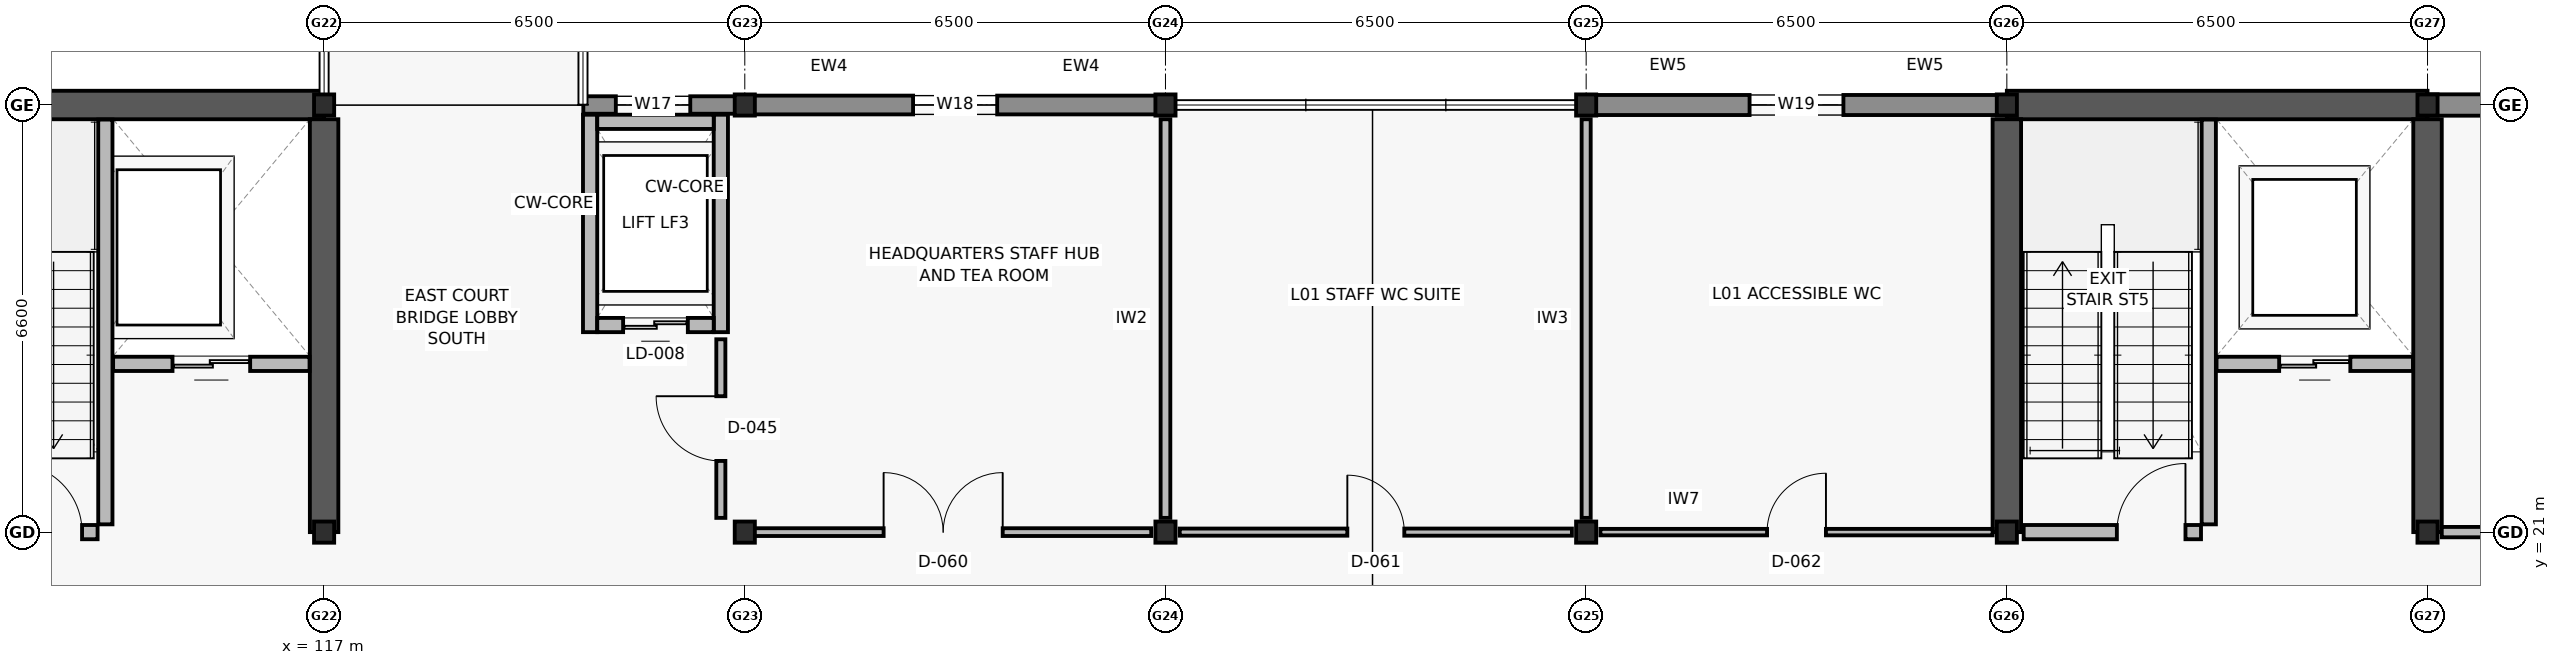
"""IFC4 building model, lengths in metres.
Left out: names, types, materials, properties, quantities, classifications, styles, units other than length and angle.
Written with IfcOpenShell. Run it as: python <this file> out.ifc"""

import sys

from ifc_helpers import new_model, si_unit, direction, frame, frame_2d, origin, origin_2d, place, context, subcontext, project, spatial, rectangle, i_section, extrude, element, fill, save


model = new_model("IFC4")
c1 = context("Model", 3, precision=1e-05, world=origin(), true_north=direction((0.0, 1.0)))
c2 = subcontext(c1, "Body", "Model", "MODEL_VIEW")
j1 = project(units=[si_unit("LENGTHUNIT", "METRE"), si_unit("PLANEANGLEUNIT", "RADIAN")], contexts=[c1])
p1 = place(None, origin())
s1 = spatial("IfcSite", under=j1, at=p1, CompositionType="ELEMENT")
p2 = place(p1, origin())
s2 = spatial("IfcBuilding", under=s1, at=p2, CompositionType="ELEMENT")
p3 = place(p2, frame((0.0, 0.0, 5.4)))
s3 = spatial("IfcBuildingStorey", under=s2, at=p3, CompositionType="ELEMENT", Elevation=5.4)
for number, where, z_axis, x_axis in (
    (1, (117.0, 21.0, 0.0), (0.0, 0.0, 1.0), (1.0, 0.0, 0.0)),
    (2, (117.0, 27.6, 0.0), (0.0, 0.0, 1.0), (1.0, 0.0, 0.0)),
    (3, (123.5, 21.0, 0.0), (0.0, 0.0, 1.0), (1.0, 0.0, 0.0)),
    (4, (123.5, 27.6, 0.0), (0.0, 0.0, 1.0), (1.0, 0.0, 0.0)),
    (5, (130.0, 21.0, 0.0), (0.0, 0.0, 1.0), (1.0, 0.0, 0.0)),
    (6, (130.0, 27.6, 0.0), (0.0, 0.0, 1.0), (1.0, 0.0, 0.0)),
    (7, (136.5, 21.0, 0.0), (0.0, 0.0, 1.0), (1.0, 0.0, 0.0)),
    (8, (136.5, 27.6, 0.0), (0.0, 0.0, 1.0), (1.0, 0.0, 0.0)),
    (9, (143.0, 21.0, 0.0), (0.0, 0.0, 1.0), (1.0, 0.0, 0.0)),
    (10, (143.0, 27.6, 0.0), (0.0, 0.0, 1.0), (1.0, 0.0, 0.0)),
    (11, (149.5, 21.0, 0.0), (0.0, 0.0, 1.0), (1.0, 0.0, 0.0)),
    (12, (149.5, 27.6, 0.0), (0.0, 0.0, 1.0), (1.0, 0.0, 0.0)),
):
    element("IfcColumn", number, at=place(p3, frame(where, z_axis=z_axis, x_axis=x_axis)), inside=s3, PredefinedType="COLUMN", context=c2, shape_type="SweptSolid", body=[
        extrude(i_section(OverallWidth=0.311, OverallDepth=0.327, WebThickness=0.016, FlangeThickness=0.025, FilletRadius=0.017, at=origin_2d()), origin(), (0.0, 0.0, 1.0), 4.2),
    ])
p4 = place(p3, frame((110.5, 27.6, 0.0), z_axis=(0.0, 0.0, 1.0), x_axis=(1.0, 0.0, 0.0)))
e13 = element("IfcWall", 13, at=p4, inside=s3, PredefinedType="SHEAR", context=c2, shape_type="SweptSolid", body=[
    extrude(rectangle(XDim=6.5, YDim=0.44, at=frame_2d((3.25, 0.0))), origin(), (0.0, 0.0, 1.0), 3.96),
])
p5 = place(p3, frame((117.0, 21.0, 0.0), z_axis=(0.0, 0.0, 1.0), x_axis=(0.0, 1.0, 0.0)))
e14 = element("IfcWall", 14, at=p5, inside=s3, PredefinedType="SHEAR", context=c2, shape_type="SweptSolid", body=[
    extrude(rectangle(XDim=6.38, YDim=0.44, at=frame_2d((3.19, 0.0))), origin(), (0.0, 0.0, 1.0), 3.96),
])
p6 = place(p3, frame((143.0, 27.6, 0.0), z_axis=(0.0, 0.0, 1.0), x_axis=(1.0, 0.0, 0.0)))
e15 = element("IfcWall", 15, at=p6, inside=s3, PredefinedType="SHEAR", context=c2, shape_type="SweptSolid", body=[
    extrude(rectangle(XDim=6.5, YDim=0.44, at=frame_2d((3.25, 0.0))), origin(), (0.0, 0.0, 1.0), 3.96),
])
for number, where, z_axis, x_axis in (
    (16, (143.0, 21.0, 0.0), (0.0, 0.0, 1.0), (0.0, 1.0, 0.0)),
    (17, (149.5, 21.0, 0.0), (0.0, 0.0, 1.0), (0.0, 1.0, 0.0)),
):
    element("IfcWall", number, at=place(p3, frame(where, z_axis=z_axis, x_axis=x_axis)), inside=s3, PredefinedType="SHEAR", context=c2, shape_type="SweptSolid", body=[
        extrude(rectangle(XDim=6.38, YDim=0.44, at=frame_2d((3.19, 0.0))), origin(), (0.0, 0.0, 1.0), 3.96),
    ])
p7 = place(p3, frame((121.005, 27.6, 0.0), z_axis=(0.0, 0.0, 1.0), x_axis=(1.0, 0.0, 0.0)))
e18 = element("IfcWall", 18, at=p7, inside=s3, PredefinedType="SOLIDWALL", context=c2, shape_type="SweptSolid", body=[
    extrude(rectangle(XDim=2.49, YDim=0.27, at=frame_2d((1.245, 0.0))), origin(), (0.0, 0.0, 1.0), 3.32),
])
p8 = place(p7, frame((0.502, 0.0, 0.8)))
e19 = element("IfcOpeningElement", 19, at=p8, cuts=e18, PredefinedType="OPENING", context=c2, shape_type="SweptSolid", body=[
    extrude(rectangle(XDim=1.15, YDim=1.8, at=frame_2d((0.575, 0.9))), frame((0.0, 0.145, 0.0), z_axis=(0.0, -1.0, 0.0), x_axis=(1.0, 0.0, 0.0)), (0.0, 0.0, 1.0), 0.29),
])
p9 = place(p3, frame((123.505, 27.6, 0.0), z_axis=(0.0, 0.0, 1.0), x_axis=(1.0, 0.0, 0.0)))
e20 = element("IfcWall", 20, at=p9, inside=s3, PredefinedType="SOLIDWALL", context=c2, shape_type="SweptSolid", body=[
    extrude(rectangle(XDim=6.49, YDim=0.29, at=frame_2d((3.245, 0.0))), origin(), (0.0, 0.0, 1.0), 3.32),
])
p10 = place(p9, frame((2.595, 0.0, 0.8)))
e21 = element("IfcOpeningElement", 21, at=p10, cuts=e20, PredefinedType="OPENING", context=c2, shape_type="SweptSolid", body=[
    extrude(rectangle(XDim=1.3, YDim=1.8, at=frame_2d((0.65, 0.9))), frame((0.0, 0.155, 0.0), z_axis=(0.0, -1.0, 0.0), x_axis=(1.0, 0.0, 0.0)), (0.0, 0.0, 1.0), 0.31),
])
p11 = place(p3, frame((136.505, 27.6, 0.0), z_axis=(0.0, 0.0, 1.0), x_axis=(1.0, 0.0, 0.0)))
e22 = element("IfcWall", 22, at=p11, inside=s3, PredefinedType="SOLIDWALL", context=c2, shape_type="SweptSolid", body=[
    extrude(rectangle(XDim=6.49, YDim=0.31, at=frame_2d((3.245, 0.0))), origin(), (0.0, 0.0, 1.0), 3.32),
])
p12 = place(p11, frame((2.52, 0.0, 0.8)))
e23 = element("IfcOpeningElement", 23, at=p12, cuts=e22, PredefinedType="OPENING", context=c2, shape_type="SweptSolid", body=[
    extrude(rectangle(XDim=1.45, YDim=1.8, at=frame_2d((0.725, 0.9))), frame((0.0, 0.165, 0.0), z_axis=(0.0, -1.0, 0.0), x_axis=(1.0, 0.0, 0.0)), (0.0, 0.0, 1.0), 0.33),
])
p13 = place(p3, frame((149.505, 27.6, 0.0), z_axis=(0.0, 0.0, 1.0), x_axis=(1.0, 0.0, 0.0)))
e24 = element("IfcWall", 24, at=p13, inside=s3, PredefinedType="SOLIDWALL", context=c2, shape_type="SweptSolid", body=[
    extrude(rectangle(XDim=6.49, YDim=0.33, at=frame_2d((3.245, 0.0))), origin(), (0.0, 0.0, 1.0), 3.32),
])
p14 = place(p13, frame((2.445, 0.0, 0.8)))
e25 = element("IfcOpeningElement", 25, at=p14, cuts=e24, PredefinedType="OPENING", context=c2, shape_type="SweptSolid", body=[
    extrude(rectangle(XDim=1.6, YDim=1.8, at=frame_2d((0.8, 0.9))), frame((0.0, 0.175, 0.0), z_axis=(0.0, -1.0, 0.0), x_axis=(1.0, 0.0, 0.0)), (0.0, 0.0, 1.0), 0.35),
])
p15 = place(p3, frame((113.62, 21.12, 0.0), z_axis=(0.0, 0.0, 1.0), x_axis=(0.0, 1.0, 0.0)))
e26 = element("IfcWall", 26, at=p15, inside=s3, PredefinedType="SOLIDWALL", context=c2, shape_type="SweptSolid", body=[
    extrude(rectangle(XDim=6.255, YDim=0.22, at=frame_2d((3.127, 0.0))), origin(), (0.0, 0.0, 1.0), 3.96),
])
p16 = place(p3, frame((110.76, 21.0, 0.0), z_axis=(0.0, 0.0, 1.0), x_axis=(1.0, 0.0, 0.0)))
e27 = element("IfcWall", 27, at=p16, inside=s3, PredefinedType="SOLIDWALL", context=c2, shape_type="SweptSolid", body=[
    extrude(rectangle(XDim=2.74, YDim=0.22, at=frame_2d((1.37, 0.0))), origin(), (0.0, 0.0, 1.0), 3.32),
])
p17 = place(p16, frame((1.44, 0.0, 0.0)))
e28 = element("IfcOpeningElement", 28, at=p17, cuts=e27, PredefinedType="OPENING", context=c2, shape_type="SweptSolid", body=[
    extrude(rectangle(XDim=1.06, YDim=2.1, at=frame_2d((0.53, 1.05))), frame((0.0, 0.12, 0.0), z_axis=(0.0, -1.0, 0.0), x_axis=(1.0, 0.0, 0.0)), (0.0, 0.0, 1.0), 0.24),
])
p18 = place(p3, frame((113.74, 23.6, 0.0), z_axis=(0.0, 0.0, 1.0), x_axis=(1.0, 0.0, 0.0)))
e29 = element("IfcWall", 29, at=p18, inside=s3, PredefinedType="SOLIDWALL", context=c2, shape_type="SweptSolid", body=[
    extrude(rectangle(XDim=3.035, YDim=0.22, at=frame_2d((1.518, 0.0))), origin(), (0.0, 0.0, 1.0), 3.96),
])
p19 = place(p18, frame((0.917, 0.0, 0.0)))
e30 = element("IfcOpeningElement", 30, at=p19, cuts=e29, PredefinedType="OPENING", context=c2, shape_type="SweptSolid", body=[
    extrude(rectangle(XDim=1.2, YDim=2.15, at=frame_2d((0.6, 1.075))), frame((0.0, 0.12, 0.0), z_axis=(0.0, -1.0, 0.0), x_axis=(1.0, 0.0, 0.0)), (0.0, 0.0, 1.0), 0.24),
])
for number, where, z_axis, x_axis in (
    (31, (121.11, 24.09, 0.0), (0.0, 0.0, 1.0), (0.0, 1.0, 0.0)),
    (32, (123.13, 24.09, 0.0), (0.0, 0.0, 1.0), (0.0, 1.0, 0.0)),
):
    element("IfcWall", number, at=place(p3, frame(where, z_axis=z_axis, x_axis=x_axis)), inside=s3, PredefinedType="SOLIDWALL", context=c2, shape_type="SweptSolid", body=[
        extrude(rectangle(XDim=3.36, YDim=0.22, at=frame_2d((1.68, 0.0))), origin(), (0.0, 0.0, 1.0), 3.96),
    ])
p20 = place(p3, frame((121.22, 27.34, 0.0), z_axis=(0.0, 0.0, 1.0), x_axis=(1.0, 0.0, 0.0)))
e33 = element("IfcWall", 33, at=p20, inside=s3, PredefinedType="SOLIDWALL", context=c2, shape_type="SweptSolid", body=[
    extrude(rectangle(XDim=1.8, YDim=0.22, at=frame_2d((0.9, 0.0))), origin(), (0.0, 0.0, 1.0), 3.96),
])
p21 = place(p3, frame((121.22, 24.2, 0.0), z_axis=(0.0, 0.0, 1.0), x_axis=(1.0, 0.0, 0.0)))
e34 = element("IfcWall", 34, at=p21, inside=s3, PredefinedType="SOLIDWALL", context=c2, shape_type="SweptSolid", body=[
    extrude(rectangle(XDim=1.8, YDim=0.22, at=frame_2d((0.9, 0.0))), origin(), (0.0, 0.0, 1.0), 3.96),
])
p22 = place(p21, frame((0.4, 0.0, 0.0)))
e35 = element("IfcOpeningElement", 35, at=p22, cuts=e34, PredefinedType="OPENING", context=c2, shape_type="SweptSolid", body=[
    extrude(rectangle(XDim=1.0, YDim=2.1, at=frame_2d((0.5, 1.05))), frame((0.0, 0.12, 0.0), z_axis=(0.0, -1.0, 0.0), x_axis=(1.0, 0.0, 0.0)), (0.0, 0.0, 1.0), 0.24),
])
p23 = place(p3, frame((146.12, 21.12, 0.0), z_axis=(0.0, 0.0, 1.0), x_axis=(0.0, 1.0, 0.0)))
e36 = element("IfcWall", 36, at=p23, inside=s3, PredefinedType="SOLIDWALL", context=c2, shape_type="SweptSolid", body=[
    extrude(rectangle(XDim=6.255, YDim=0.22, at=frame_2d((3.127, 0.0))), origin(), (0.0, 0.0, 1.0), 3.96),
])
p24 = place(p3, frame((143.26, 21.0, 0.0), z_axis=(0.0, 0.0, 1.0), x_axis=(1.0, 0.0, 0.0)))
e37 = element("IfcWall", 37, at=p24, inside=s3, PredefinedType="SOLIDWALL", context=c2, shape_type="SweptSolid", body=[
    extrude(rectangle(XDim=2.74, YDim=0.22, at=frame_2d((1.37, 0.0))), origin(), (0.0, 0.0, 1.0), 3.32),
])
p25 = place(p24, frame((1.44, 0.0, 0.0)))
e38 = element("IfcOpeningElement", 38, at=p25, cuts=e37, PredefinedType="OPENING", context=c2, shape_type="SweptSolid", body=[
    extrude(rectangle(XDim=1.06, YDim=2.1, at=frame_2d((0.53, 1.05))), frame((0.0, 0.12, 0.0), z_axis=(0.0, -1.0, 0.0), x_axis=(1.0, 0.0, 0.0)), (0.0, 0.0, 1.0), 0.24),
])
p26 = place(p3, frame((146.24, 23.6, 0.0), z_axis=(0.0, 0.0, 1.0), x_axis=(1.0, 0.0, 0.0)))
e39 = element("IfcWall", 39, at=p26, inside=s3, PredefinedType="SOLIDWALL", context=c2, shape_type="SweptSolid", body=[
    extrude(rectangle(XDim=3.035, YDim=0.22, at=frame_2d((1.518, 0.0))), origin(), (0.0, 0.0, 1.0), 3.96),
])
p27 = place(p26, frame((0.968, 0.0, 0.0)))
e40 = element("IfcOpeningElement", 40, at=p27, cuts=e39, PredefinedType="OPENING", context=c2, shape_type="SweptSolid", body=[
    extrude(rectangle(XDim=1.1, YDim=2.1, at=frame_2d((0.55, 1.05))), frame((0.0, 0.12, 0.0), z_axis=(0.0, -1.0, 0.0), x_axis=(1.0, 0.0, 0.0)), (0.0, 0.0, 1.0), 0.24),
])
p28 = place(p3, frame((123.13, 21.22, 0.0), z_axis=(0.0, 0.0, 1.0), x_axis=(0.0, 1.0, 0.0)))
e41 = element("IfcWall", 41, at=p28, inside=s3, PredefinedType="PARTITIONING", context=c2, shape_type="SweptSolid", body=[
    extrude(rectangle(XDim=2.76, YDim=0.14, at=frame_2d((1.38, 0.0))), origin(), (0.0, 0.0, 1.0), 3.3),
])
p29 = place(p28, frame((0.88, 0.0, 0.0)))
e42 = element("IfcOpeningElement", 42, at=p29, cuts=e41, PredefinedType="OPENING", context=c2, shape_type="SweptSolid", body=[
    extrude(rectangle(XDim=1.0, YDim=2.12, at=frame_2d((0.5, 1.06))), frame((0.0, 0.08, 0.0), z_axis=(0.0, -1.0, 0.0), x_axis=(1.0, 0.0, 0.0)), (0.0, 0.0, 1.0), 0.16),
])
p30 = place(p3, frame((123.35, 21.0, 0.0), z_axis=(0.0, 0.0, 1.0), x_axis=(1.0, 0.0, 0.0)))
e43 = element("IfcWall", 43, at=p30, inside=s3, PredefinedType="PARTITIONING", context=c2, shape_type="SweptSolid", body=[
    extrude(rectangle(XDim=6.43, YDim=0.12, at=frame_2d((3.215, 0.0))), origin(), (0.0, 0.0, 1.0), 3.3),
])
p31 = place(p30, frame((2.295, 0.0, 0.0)))
e44 = element("IfcOpeningElement", 44, at=p31, cuts=e43, PredefinedType="OPENING", context=c2, shape_type="SweptSolid", body=[
    extrude(rectangle(XDim=1.84, YDim=2.22, at=frame_2d((0.92, 1.11))), frame((0.0, 0.07, 0.0), z_axis=(0.0, -1.0, 0.0), x_axis=(1.0, 0.0, 0.0)), (0.0, 0.0, 1.0), 0.14),
])
p32 = place(p3, frame((130.22, 21.0, 0.0), z_axis=(0.0, 0.0, 1.0), x_axis=(1.0, 0.0, 0.0)))
e45 = element("IfcWall", 45, at=p32, inside=s3, PredefinedType="PARTITIONING", context=c2, shape_type="SweptSolid", body=[
    extrude(rectangle(XDim=6.06, YDim=0.11, at=frame_2d((3.03, 0.0))), origin(), (0.0, 0.0, 1.0), 3.3),
])
p33 = place(p32, frame((2.59, 0.0, 0.0)))
e46 = element("IfcOpeningElement", 46, at=p33, cuts=e45, PredefinedType="OPENING", context=c2, shape_type="SweptSolid", body=[
    extrude(rectangle(XDim=0.88, YDim=2.04, at=frame_2d((0.44, 1.02))), frame((0.0, 0.065, 0.0), z_axis=(0.0, -1.0, 0.0), x_axis=(1.0, 0.0, 0.0)), (0.0, 0.0, 1.0), 0.13),
])
p34 = place(p3, frame((136.72, 21.0, 0.0), z_axis=(0.0, 0.0, 1.0), x_axis=(1.0, 0.0, 0.0)))
e47 = element("IfcWall", 47, at=p34, inside=s3, PredefinedType="PARTITIONING", context=c2, shape_type="SweptSolid", body=[
    extrude(rectangle(XDim=6.06, YDim=0.1, at=frame_2d((3.03, 0.0))), origin(), (0.0, 0.0, 1.0), 3.3),
])
p35 = place(p34, frame((2.575, 0.0, 0.0)))
e48 = element("IfcOpeningElement", 48, at=p35, cuts=e47, PredefinedType="OPENING", context=c2, shape_type="SweptSolid", body=[
    extrude(rectangle(XDim=0.91, YDim=2.06, at=frame_2d((0.455, 1.03))), frame((0.0, 0.06, 0.0), z_axis=(0.0, -1.0, 0.0), x_axis=(1.0, 0.0, 0.0)), (0.0, 0.0, 1.0), 0.12),
])
p36 = place(p3, frame((149.72, 21.0, 0.0), z_axis=(0.0, 0.0, 1.0), x_axis=(1.0, 0.0, 0.0)))
e49 = element("IfcWall", 49, at=p36, inside=s3, PredefinedType="PARTITIONING", context=c2, shape_type="SweptSolid", body=[
    extrude(rectangle(XDim=12.46, YDim=0.16, at=frame_2d((6.23, 0.0))), origin(), (0.0, 0.0, 1.0), 3.3),
])
p37 = place(p36, frame((5.01, 0.0, 0.0)))
e50 = element("IfcOpeningElement", 50, at=p37, cuts=e49, PredefinedType="OPENING", context=c2, shape_type="SweptSolid", body=[
    extrude(rectangle(XDim=0.94, YDim=2.08, at=frame_2d((0.47, 1.04))), frame((0.0, 0.09, 0.0), z_axis=(0.0, -1.0, 0.0), x_axis=(1.0, 0.0, 0.0)), (0.0, 0.0, 1.0), 0.18),
])
p38 = place(p3, frame((130.0, 21.22, 0.0), z_axis=(0.0, 0.0, 1.0), x_axis=(0.0, 1.0, 0.0)))
e51 = element("IfcWall", 51, at=p38, inside=s3, PredefinedType="PARTITIONING", context=c2, shape_type="SweptSolid", body=[
    extrude(rectangle(XDim=6.16, YDim=0.15, at=frame_2d((3.08, 0.0))), origin(), (0.0, 0.0, 1.0), 3.3),
])
p39 = place(p3, frame((136.5, 21.22, 0.0), z_axis=(0.0, 0.0, 1.0), x_axis=(0.0, 1.0, 0.0)))
e52 = element("IfcWall", 52, at=p39, inside=s3, PredefinedType="PARTITIONING", context=c2, shape_type="SweptSolid", body=[
    extrude(rectangle(XDim=6.16, YDim=0.14, at=frame_2d((3.08, 0.0))), origin(), (0.0, 0.0, 1.0), 3.3),
])
p40 = place(p8, origin())
e53 = element("IfcWindow", 53, at=p40, inside=s3, PartitioningType="SINGLE_PANEL", PredefinedType="WINDOW", context=c2, shape_type="SweptSolid", body=[
    extrude(rectangle(XDim=1.15, YDim=1.8, at=frame_2d((0.575, 0.9))), frame((0.0, 0.03, 0.0), z_axis=(0.0, -1.0, 0.0), x_axis=(1.0, 0.0, 0.0)), (0.0, 0.0, 1.0), 0.06),
])
fill(e19, e53)
p41 = place(p10, origin())
e54 = element("IfcWindow", 54, at=p41, inside=s3, PartitioningType="SINGLE_PANEL", PredefinedType="WINDOW", context=c2, shape_type="SweptSolid", body=[
    extrude(rectangle(XDim=1.3, YDim=1.8, at=frame_2d((0.65, 0.9))), frame((0.0, 0.03, 0.0), z_axis=(0.0, -1.0, 0.0), x_axis=(1.0, 0.0, 0.0)), (0.0, 0.0, 1.0), 0.06),
])
fill(e21, e54)
p42 = place(p12, origin())
e55 = element("IfcWindow", 55, at=p42, inside=s3, PartitioningType="SINGLE_PANEL", PredefinedType="WINDOW", context=c2, shape_type="SweptSolid", body=[
    extrude(rectangle(XDim=1.45, YDim=1.8, at=frame_2d((0.725, 0.9))), frame((0.0, 0.03, 0.0), z_axis=(0.0, -1.0, 0.0), x_axis=(1.0, 0.0, 0.0)), (0.0, 0.0, 1.0), 0.06),
])
fill(e23, e55)
p43 = place(p17, origin())
e56 = element("IfcDoor", 56, at=p43, inside=s3, OperationType="SINGLE_SWING_LEFT", PredefinedType="DOOR", context=c2, shape_type="SweptSolid", body=[
    extrude(rectangle(XDim=1.06, YDim=2.1, at=frame_2d((0.53, 1.05))), frame((0.0, 0.025, 0.0), z_axis=(0.0, -1.0, 0.0), x_axis=(1.0, 0.0, 0.0)), (0.0, 0.0, 1.0), 0.05),
])
fill(e28, e56)
p44 = place(p19, origin())
e57 = element("IfcDoor", 57, at=p44, inside=s3, OperationType="DOUBLE_DOOR_SLIDING", PredefinedType="DOOR", context=c2, shape_type="SweptSolid", body=[
    extrude(rectangle(XDim=1.2, YDim=2.15, at=frame_2d((0.6, 1.075))), frame((0.0, 0.025, 0.0), z_axis=(0.0, -1.0, 0.0), x_axis=(1.0, 0.0, 0.0)), (0.0, 0.0, 1.0), 0.05),
])
fill(e30, e57)
p45 = place(p22, origin())
e58 = element("IfcDoor", 58, at=p45, inside=s3, OperationType="DOUBLE_DOOR_SLIDING", PredefinedType="DOOR", context=c2, shape_type="SweptSolid", body=[
    extrude(rectangle(XDim=1.0, YDim=2.1, at=frame_2d((0.5, 1.05))), frame((0.0, 0.025, 0.0), z_axis=(0.0, -1.0, 0.0), x_axis=(1.0, 0.0, 0.0)), (0.0, 0.0, 1.0), 0.05),
])
fill(e35, e58)
p46 = place(p25, origin())
e59 = element("IfcDoor", 59, at=p46, inside=s3, OperationType="SINGLE_SWING_RIGHT", PredefinedType="DOOR", context=c2, shape_type="SweptSolid", body=[
    extrude(rectangle(XDim=1.06, YDim=2.1, at=frame_2d((0.53, 1.05))), frame((0.0, 0.025, 0.0), z_axis=(0.0, -1.0, 0.0), x_axis=(1.0, 0.0, 0.0)), (0.0, 0.0, 1.0), 0.05),
])
fill(e38, e59)
p47 = place(p27, origin())
e60 = element("IfcDoor", 60, at=p47, inside=s3, OperationType="DOUBLE_DOOR_SLIDING", PredefinedType="DOOR", context=c2, shape_type="SweptSolid", body=[
    extrude(rectangle(XDim=1.1, YDim=2.1, at=frame_2d((0.55, 1.05))), frame((0.0, 0.025, 0.0), z_axis=(0.0, -1.0, 0.0), x_axis=(1.0, 0.0, 0.0)), (0.0, 0.0, 1.0), 0.05),
])
fill(e40, e60)
p48 = place(p29, origin())
e61 = element("IfcDoor", 61, at=p48, inside=s3, OperationType="SINGLE_SWING_RIGHT", PredefinedType="DOOR", context=c2, shape_type="SweptSolid", body=[
    extrude(rectangle(XDim=1.0, YDim=2.12, at=frame_2d((0.5, 1.06))), frame((0.0, 0.025, 0.0), z_axis=(0.0, -1.0, 0.0), x_axis=(1.0, 0.0, 0.0)), (0.0, 0.0, 1.0), 0.05),
])
fill(e42, e61)
p49 = place(p31, origin())
e62 = element("IfcDoor", 62, at=p49, inside=s3, OperationType="DOUBLE_DOOR_SINGLE_SWING", PredefinedType="DOOR", context=c2, shape_type="SweptSolid", body=[
    extrude(rectangle(XDim=1.84, YDim=2.22, at=frame_2d((0.92, 1.11))), frame((0.0, 0.025, 0.0), z_axis=(0.0, -1.0, 0.0), x_axis=(1.0, 0.0, 0.0)), (0.0, 0.0, 1.0), 0.05),
])
fill(e44, e62)
p50 = place(p33, origin())
e63 = element("IfcDoor", 63, at=p50, inside=s3, OperationType="SINGLE_SWING_LEFT", PredefinedType="DOOR", context=c2, shape_type="SweptSolid", body=[
    extrude(rectangle(XDim=0.88, YDim=2.04, at=frame_2d((0.44, 1.02))), frame((0.0, 0.025, 0.0), z_axis=(0.0, -1.0, 0.0), x_axis=(1.0, 0.0, 0.0)), (0.0, 0.0, 1.0), 0.05),
])
fill(e46, e63)
p51 = place(p35, origin())
e64 = element("IfcDoor", 64, at=p51, inside=s3, OperationType="SINGLE_SWING_RIGHT", PredefinedType="DOOR", context=c2, shape_type="SweptSolid", body=[
    extrude(rectangle(XDim=0.91, YDim=2.06, at=frame_2d((0.455, 1.03))), frame((0.0, 0.025, 0.0), z_axis=(0.0, -1.0, 0.0), x_axis=(1.0, 0.0, 0.0)), (0.0, 0.0, 1.0), 0.05),
])
fill(e48, e64)
save(model, sys.argv[1])
